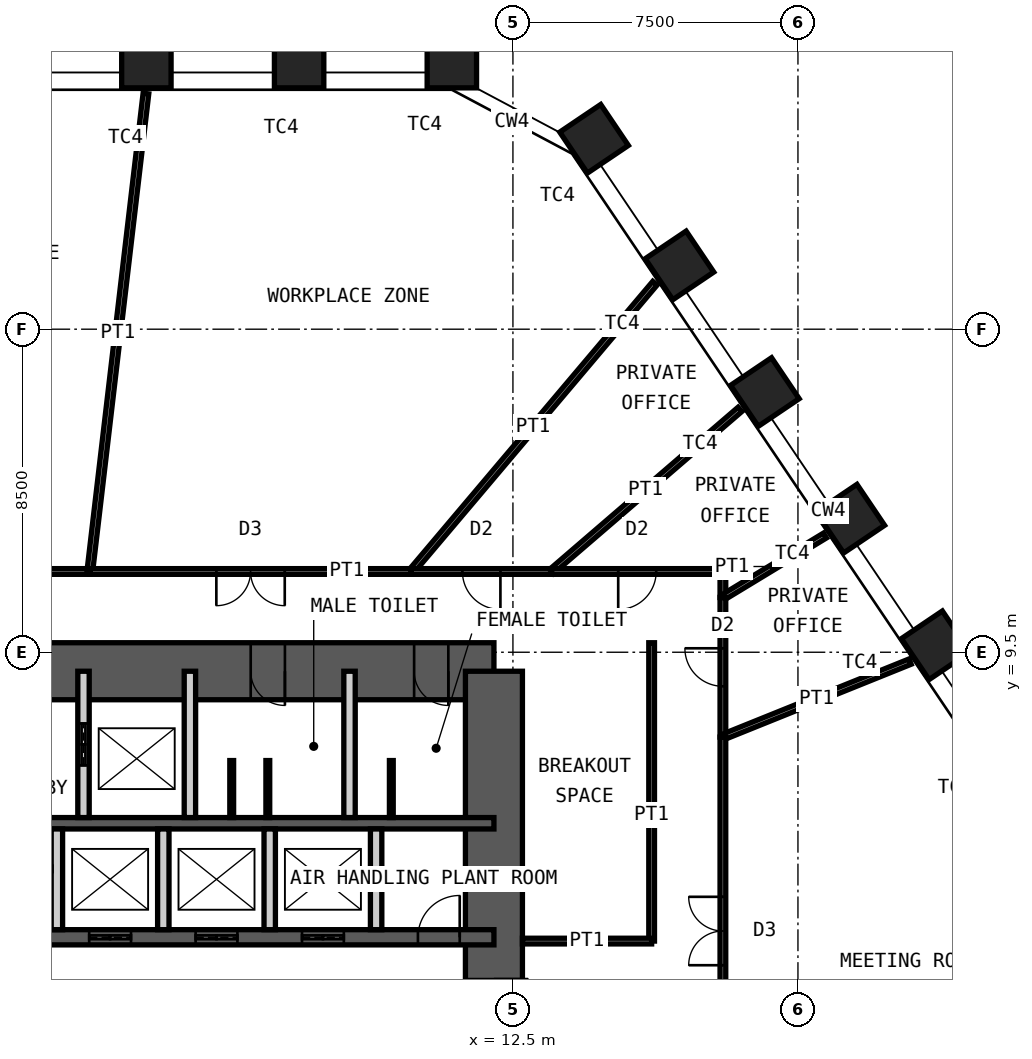
"""IFC4 building model, lengths in metres.
Left out: names, types, materials, properties, quantities, classifications, styles, units other than length and angle.
Written with IfcOpenShell. Run it as: python <this file> out.ifc"""

import sys

from ifc_helpers import new_model, si_unit, direction, frame, frame_2d, origin, origin_2d, place, context, subcontext, project, spatial, rectangle, hollow_rectangle, extrude, element, fill, save


model = new_model("IFC4")
c1 = context("Model", 3, precision=1e-05, world=origin(), true_north=direction((0.0, 1.0)))
c2 = subcontext(c1, "Body", "Model", "MODEL_VIEW")
j1 = project(units=[si_unit("LENGTHUNIT", "METRE"), si_unit("PLANEANGLEUNIT", "RADIAN")], contexts=[c1])
p1 = place(None, origin())
s1 = spatial("IfcSite", under=j1, at=p1, CompositionType="ELEMENT")
p2 = place(p1, origin())
s2 = spatial("IfcBuilding", under=s1, at=p2, CompositionType="ELEMENT")
p3 = place(p2, frame((0.0, 0.0, 157.6)))
s3 = spatial("IfcBuildingStorey", under=s2, at=p3, CompositionType="ELEMENT", Elevation=157.6)
for number, where, z_axis, x_axis in (
    (1, (2.854, 25.0, 0.0), (0.0, 0.0, 1.0), (-1.0, 0.0, 0.0)),
    (2, (6.874, 25.0, 0.0), (0.0, 0.0, 1.0), (-1.0, 0.0, 0.0)),
    (3, (10.893, 25.0, 0.0), (0.0, 0.0, 1.0), (-1.0, 0.0, 0.0)),
    (4, (14.635, 23.01, 0.0), (0.0, 0.0, 1.0), (-0.559, 0.829, 0.0)),
    (5, (16.882, 19.678, 0.0), (0.0, 0.0, 1.0), (-0.559, 0.829, 0.0)),
    (6, (19.13, 16.346, 0.0), (0.0, 0.0, 1.0), (-0.559, 0.829, 0.0)),
    (7, (21.377, 13.014, 0.0), (0.0, 0.0, 1.0), (-0.559, 0.829, 0.0)),
    (8, (23.625, 9.682, 0.0), (0.0, 0.0, 1.0), (-0.559, 0.829, 0.0)),
):
    element("IfcColumn", number, at=place(p3, frame(where, z_axis=z_axis, x_axis=x_axis)), inside=s3, PredefinedType="COLUMN", context=c2, shape_type="SweptSolid", body=[
        extrude(hollow_rectangle(XDim=1.3, YDim=1.3, WallThickness=0.1, at=origin_2d()), origin(), (0.0, 0.0, 1.0), 4.2),
    ])
p4 = place(p3, frame((-12.0, 9.0, 0.0), z_axis=(0.0, 0.0, 1.0), x_axis=(1.0, 0.0, 0.0)))
e9 = element("IfcWall", 9, at=p4, inside=s3, PredefinedType="SHEAR", context=c2, shape_type="SweptSolid", body=[
    extrude(rectangle(XDim=24.0, YDim=1.5, at=frame_2d((12.0, 0.0))), origin(), (0.0, 0.0, 1.0), 4.2),
])
p5 = place(p4, frame((10.4, 0.0, 0.0)))
e10 = element("IfcOpeningElement", 10, at=p5, cuts=e9, PredefinedType="OPENING", context=c2, shape_type="SweptSolid", body=[
    extrude(rectangle(XDim=1.0, YDim=2.1, at=frame_2d((0.5, 1.05))), frame((0.0, 0.76, 0.0), z_axis=(0.0, -1.0, 0.0), x_axis=(1.0, 0.0, 0.0)), (0.0, 0.0, 1.0), 1.52),
])
p6 = place(p4, frame((17.6, 0.0, 0.0)))
e11 = element("IfcOpeningElement", 11, at=p6, cuts=e9, PredefinedType="OPENING", context=c2, shape_type="SweptSolid", body=[
    extrude(rectangle(XDim=0.9, YDim=2.1, at=frame_2d((0.45, 1.05))), frame((0.0, 0.76, 0.0), z_axis=(0.0, -1.0, 0.0), x_axis=(1.0, 0.0, 0.0)), (0.0, 0.0, 1.0), 1.52),
])
p7 = place(p4, frame((21.9, 0.0, 0.0)))
e12 = element("IfcOpeningElement", 12, at=p7, cuts=e9, PredefinedType="OPENING", context=c2, shape_type="SweptSolid", body=[
    extrude(rectangle(XDim=0.9, YDim=2.1, at=frame_2d((0.45, 1.05))), frame((0.0, 0.76, 0.0), z_axis=(0.0, -1.0, 0.0), x_axis=(1.0, 0.0, 0.0)), (0.0, 0.0, 1.0), 1.52),
])
p8 = place(p3, frame((12.0, -9.0, 0.0), z_axis=(0.0, 0.0, 1.0), x_axis=(0.0, 1.0, 0.0)))
e13 = element("IfcWall", 13, at=p8, inside=s3, PredefinedType="SHEAR", context=c2, shape_type="SweptSolid", body=[
    extrude(rectangle(XDim=18.0, YDim=1.5, at=frame_2d((9.0, 0.0))), origin(), (0.0, 0.0, 1.0), 4.2),
])
p9 = place(p8, frame((8.1, 0.0, 0.0)))
e14 = element("IfcOpeningElement", 14, at=p9, cuts=e13, PredefinedType="OPENING", context=c2, shape_type="SweptSolid", body=[
    extrude(rectangle(XDim=1.8, YDim=2.1, at=frame_2d((0.9, 1.05))), frame((0.0, 0.76, 0.0), z_axis=(0.0, -1.0, 0.0), x_axis=(1.0, 0.0, 0.0)), (0.0, 0.0, 1.0), 1.52),
])
p10 = place(p3, frame((-12.0, 5.0, 0.0), z_axis=(0.0, 0.0, 1.0), x_axis=(1.0, 0.0, 0.0)))
e15 = element("IfcWall", 15, at=p10, inside=s3, PredefinedType="SHEAR", context=c2, shape_type="SweptSolid", body=[
    extrude(rectangle(XDim=24.0, YDim=0.3, at=frame_2d((12.0, 0.0))), origin(), (0.0, 0.0, 1.0), 4.2),
])
p11 = place(p3, frame((-12.0, 2.0, 0.0), z_axis=(0.0, 0.0, 1.0), x_axis=(1.0, 0.0, 0.0)))
e16 = element("IfcWall", 16, at=p11, inside=s3, PredefinedType="SHEAR", context=c2, shape_type="SweptSolid", body=[
    extrude(rectangle(XDim=24.0, YDim=0.4, at=frame_2d((12.0, 0.0))), origin(), (0.0, 0.0, 1.0), 4.2),
])
p12 = place(p11, frame((2.4, 0.0, 0.0)))
e17 = element("IfcOpeningElement", 17, at=p12, cuts=e16, PredefinedType="OPENING", context=c2, shape_type="SweptSolid", body=[
    extrude(rectangle(XDim=1.1, YDim=2.1, at=frame_2d((0.55, 1.05))), frame((0.0, 0.21, 0.0), z_axis=(0.0, -1.0, 0.0), x_axis=(1.0, 0.0, 0.0)), (0.0, 0.0, 1.0), 0.42),
])
p13 = place(p11, frame((22.0, 0.0, 0.0)))
e18 = element("IfcOpeningElement", 18, at=p13, cuts=e16, PredefinedType="OPENING", context=c2, shape_type="SweptSolid", body=[
    extrude(rectangle(XDim=1.1, YDim=2.1, at=frame_2d((0.55, 1.05))), frame((0.0, 0.21, 0.0), z_axis=(0.0, -1.0, 0.0), x_axis=(1.0, 0.0, 0.0)), (0.0, 0.0, 1.0), 0.42),
])
p14 = place(p11, frame((10.15, 0.0, 0.0)))
e19 = element("IfcOpeningElement", 19, at=p14, cuts=e16, PredefinedType="OPENING", context=c2, shape_type="SweptSolid", body=[
    extrude(rectangle(XDim=1.0, YDim=2.1, at=frame_2d((0.5, 1.05))), frame((0.0, 0.21, 0.0), z_axis=(0.0, -1.0, 0.0), x_axis=(1.0, 0.0, 0.0)), (0.0, 0.0, 1.0), 0.42),
])
p15 = place(p11, frame((6.9, 0.0, 0.0)))
e20 = element("IfcOpeningElement", 20, at=p15, cuts=e16, PredefinedType="OPENING", context=c2, shape_type="SweptSolid", body=[
    extrude(rectangle(XDim=1.0, YDim=2.1, at=frame_2d((0.5, 1.05))), frame((0.0, 0.21, 0.0), z_axis=(0.0, -1.0, 0.0), x_axis=(1.0, 0.0, 0.0)), (0.0, 0.0, 1.0), 0.42),
])
p16 = place(p11, frame((13.35, 0.0, 0.0)))
e21 = element("IfcOpeningElement", 21, at=p16, cuts=e16, PredefinedType="OPENING", context=c2, shape_type="SweptSolid", body=[
    extrude(rectangle(XDim=1.1, YDim=2.4, at=frame_2d((0.55, 1.2))), frame((0.0, 0.21, 0.0), z_axis=(0.0, -1.0, 0.0), x_axis=(1.0, 0.0, 0.0)), (0.0, 0.0, 1.0), 0.42),
])
p17 = place(p11, frame((16.15, 0.0, 0.0)))
e22 = element("IfcOpeningElement", 22, at=p17, cuts=e16, PredefinedType="OPENING", context=c2, shape_type="SweptSolid", body=[
    extrude(rectangle(XDim=1.1, YDim=2.4, at=frame_2d((0.55, 1.2))), frame((0.0, 0.21, 0.0), z_axis=(0.0, -1.0, 0.0), x_axis=(1.0, 0.0, 0.0)), (0.0, 0.0, 1.0), 0.42),
])
p18 = place(p11, frame((18.95, 0.0, 0.0)))
e23 = element("IfcOpeningElement", 23, at=p18, cuts=e16, PredefinedType="OPENING", context=c2, shape_type="SweptSolid", body=[
    extrude(rectangle(XDim=1.1, YDim=2.4, at=frame_2d((0.55, 1.2))), frame((0.0, 0.21, 0.0), z_axis=(0.0, -1.0, 0.0), x_axis=(1.0, 0.0, 0.0)), (0.0, 0.0, 1.0), 0.42),
])
p19 = place(p3, frame((1.2, 5.15, 0.0), z_axis=(0.0, 0.0, 1.0), x_axis=(0.0, 1.0, 0.0)))
e24 = element("IfcWall", 24, at=p19, inside=s3, PredefinedType="PARTITIONING", context=c2, shape_type="SweptSolid", body=[
    extrude(rectangle(XDim=3.85, YDim=0.3, at=frame_2d((1.925, 0.0))), origin(), (0.0, 0.0, 1.0), 3.98),
])
p20 = place(p19, frame((1.375, 0.0, 0.0)))
e25 = element("IfcOpeningElement", 25, at=p20, cuts=e24, PredefinedType="OPENING", context=c2, shape_type="SweptSolid", body=[
    extrude(rectangle(XDim=1.1, YDim=2.4, at=frame_2d((0.55, 1.2))), frame((0.0, 0.16, 0.0), z_axis=(0.0, -1.0, 0.0), x_axis=(1.0, 0.0, 0.0)), (0.0, 0.0, 1.0), 0.32),
])
for number, where, z_axis, x_axis in (
    (26, (4.0, 5.15, 0.0), (0.0, 0.0, 1.0), (0.0, 1.0, 0.0)),
    (27, (8.2, 5.15, 0.0), (0.0, 0.0, 1.0), (0.0, 1.0, 0.0)),
):
    element("IfcWall", number, at=place(p3, frame(where, z_axis=z_axis, x_axis=x_axis)), inside=s3, PredefinedType="PARTITIONING", context=c2, shape_type="SweptSolid", body=[
        extrude(rectangle(XDim=3.85, YDim=0.3, at=frame_2d((1.925, 0.0))), origin(), (0.0, 0.0, 1.0), 3.98),
    ])
for number, where, z_axis, x_axis in (
    (28, (0.5, 2.2, 0.0), (0.0, 0.0, 1.0), (0.0, 1.0, 0.0)),
    (29, (3.3, 2.2, 0.0), (0.0, 0.0, 1.0), (0.0, 1.0, 0.0)),
    (30, (6.1, 2.2, 0.0), (0.0, 0.0, 1.0), (0.0, 1.0, 0.0)),
    (31, (8.9, 2.2, 0.0), (0.0, 0.0, 1.0), (0.0, 1.0, 0.0)),
):
    element("IfcWall", number, at=place(p3, frame(where, z_axis=z_axis, x_axis=x_axis)), inside=s3, PredefinedType="PARTITIONING", context=c2, shape_type="SweptSolid", body=[
        extrude(rectangle(XDim=2.65, YDim=0.3, at=frame_2d((1.325, 0.0))), origin(), (0.0, 0.0, 1.0), 3.98),
    ])
for number, where, z_axis, x_axis in (
    (32, (5.1, 5.15, 0.0), (0.0, 0.0, 1.0), (0.0, 1.0, 0.0)),
    (33, (6.05, 5.15, 0.0), (0.0, 0.0, 1.0), (0.0, 1.0, 0.0)),
    (34, (9.3, 5.15, 0.0), (0.0, 0.0, 1.0), (0.0, 1.0, 0.0)),
):
    element("IfcWall", number, at=place(p3, frame(where, z_axis=z_axis, x_axis=x_axis)), inside=s3, PredefinedType="PARTITIONING", context=c2, shape_type="SweptSolid", body=[
        extrude(rectangle(XDim=1.5, YDim=0.1, at=frame_2d((0.75, 0.0))), origin(), (0.0, 0.0, 1.0), 2.1),
    ])
p21 = place(p3, frame((16.237, 19.21, 0.0), z_axis=(0.0, 0.0, 1.0), x_axis=(-0.645526723652, -0.763737683404, 0.0)))
e35 = element("IfcWall", 35, at=p21, inside=s3, PredefinedType="PARTITIONING", context=c2, shape_type="SweptSolid", body=[
    extrude(rectangle(XDim=9.932, YDim=0.15, at=frame_2d((4.966, 0.0))), origin(), (0.0, 0.0, 1.0), 3.33),
])
p22 = place(p3, frame((9.826, 11.625, 0.0), z_axis=(0.0, 0.0, 1.0), x_axis=(1.0, 0.0, 0.0)))
e36 = element("IfcWall", 36, at=p22, inside=s3, PredefinedType="PARTITIONING", context=c2, shape_type="SweptSolid", body=[
    extrude(rectangle(XDim=3.689, YDim=0.15, at=frame_2d((1.845, 0.0))), origin(), (0.0, 0.0, 1.0), 4.03),
])
p23 = place(p22, frame((1.345, 0.0, 0.0)))
e37 = element("IfcOpeningElement", 37, at=p23, cuts=e36, PredefinedType="OPENING", context=c2, shape_type="SweptSolid", body=[
    extrude(rectangle(XDim=1.0, YDim=2.4, at=frame_2d((0.5, 1.2))), frame((0.0, 0.085, 0.0), z_axis=(0.0, -1.0, 0.0), x_axis=(1.0, 0.0, 0.0)), (0.0, 0.0, 1.0), 0.17),
])
p24 = place(p3, frame((18.474, 15.89, 0.0), z_axis=(0.0, 0.0, 1.0), x_axis=(-0.758143486665, -0.65208776528, 0.0)))
e38 = element("IfcWall", 38, at=p24, inside=s3, PredefinedType="PARTITIONING", context=c2, shape_type="SweptSolid", body=[
    extrude(rectangle(XDim=6.54, YDim=0.15, at=frame_2d((3.27, 0.0))), origin(), (0.0, 0.0, 1.0), 3.33),
])
p25 = place(p3, frame((13.515, 11.625, 0.0), z_axis=(0.0, 0.0, 1.0), x_axis=(1.0, 0.0, 0.0)))
e39 = element("IfcWall", 39, at=p25, inside=s3, PredefinedType="PARTITIONING", context=c2, shape_type="SweptSolid", body=[
    extrude(rectangle(XDim=4.51, YDim=0.15, at=frame_2d((2.255, 0.0))), origin(), (0.0, 0.0, 1.0), 4.03),
])
p26 = place(p25, frame((1.755, 0.0, 0.0)))
e40 = element("IfcOpeningElement", 40, at=p26, cuts=e39, PredefinedType="OPENING", context=c2, shape_type="SweptSolid", body=[
    extrude(rectangle(XDim=1.0, YDim=2.4, at=frame_2d((0.5, 1.2))), frame((0.0, 0.085, 0.0), z_axis=(0.0, -1.0, 0.0), x_axis=(1.0, 0.0, 0.0)), (0.0, 0.0, 1.0), 0.17),
])
p27 = place(p3, frame((18.025, 11.625, 0.0), z_axis=(0.0, 0.0, 1.0), x_axis=(0.0, -1.0, 0.0)))
e41 = element("IfcWall", 41, at=p27, inside=s3, PredefinedType="PARTITIONING", context=c2, shape_type="SweptSolid", body=[
    extrude(rectangle(XDim=0.684, YDim=0.15, at=frame_2d((0.342, 0.0))), origin(), (0.0, 0.0, 1.0), 4.03),
])
p28 = place(p3, frame((20.711, 12.571, 0.0), z_axis=(0.0, 0.0, 1.0), x_axis=(-0.854890890653, -0.518807830587, 0.0)))
e42 = element("IfcWall", 42, at=p28, inside=s3, PredefinedType="PARTITIONING", context=c2, shape_type="SweptSolid", body=[
    extrude(rectangle(XDim=3.143, YDim=0.15, at=frame_2d((1.571, 0.0))), origin(), (0.0, 0.0, 1.0), 3.33),
])
p29 = place(p3, frame((18.025, 10.941, 0.0), z_axis=(0.0, 0.0, 1.0), x_axis=(0.0, -1.0, 0.0)))
e43 = element("IfcWall", 43, at=p29, inside=s3, PredefinedType="PARTITIONING", context=c2, shape_type="SweptSolid", body=[
    extrude(rectangle(XDim=3.673, YDim=0.15, at=frame_2d((1.837, 0.0))), origin(), (0.0, 0.0, 1.0), 4.03),
])
p30 = place(p29, frame((1.337, 0.0, 0.0)))
e44 = element("IfcOpeningElement", 44, at=p30, cuts=e43, PredefinedType="OPENING", context=c2, shape_type="SweptSolid", body=[
    extrude(rectangle(XDim=1.0, YDim=2.4, at=frame_2d((0.5, 1.2))), frame((0.0, 0.085, 0.0), z_axis=(0.0, -1.0, 0.0), x_axis=(1.0, 0.0, 0.0)), (0.0, 0.0, 1.0), 0.17),
])
p31 = place(p3, frame((22.951, 9.254, 0.0), z_axis=(0.0, 0.0, 1.0), x_axis=(-0.927452527427, -0.37394091695, 0.0)))
e45 = element("IfcWall", 45, at=p31, inside=s3, PredefinedType="PARTITIONING", context=c2, shape_type="SweptSolid", body=[
    extrude(rectangle(XDim=5.312, YDim=0.15, at=frame_2d((2.656, 0.0))), origin(), (0.0, 0.0, 1.0), 3.33),
])
p32 = place(p3, frame((18.025, 7.267, 0.0), z_axis=(0.0, 0.0, 1.0), x_axis=(0.0, -1.0, 0.0)))
e46 = element("IfcWall", 46, at=p32, inside=s3, PredefinedType="PARTITIONING", context=c2, shape_type="SweptSolid", body=[
    extrude(rectangle(XDim=10.205, YDim=0.15, at=frame_2d((5.103, 0.0))), origin(), (0.0, 0.0, 1.0), 4.03),
])
p33 = place(p32, frame((4.203, 0.0, 0.0)))
e47 = element("IfcOpeningElement", 47, at=p33, cuts=e46, PredefinedType="OPENING", context=c2, shape_type="SweptSolid", body=[
    extrude(rectangle(XDim=1.8, YDim=2.4, at=frame_2d((0.9, 1.2))), frame((0.0, 0.085, 0.0), z_axis=(0.0, -1.0, 0.0), x_axis=(1.0, 0.0, 0.0)), (0.0, 0.0, 1.0), 0.17),
])
p34 = place(p3, frame((-4.403, 11.625, 0.0), z_axis=(0.0, 0.0, 1.0), x_axis=(1.0, 0.0, 0.0)))
e48 = element("IfcWall", 48, at=p34, inside=s3, PredefinedType="PARTITIONING", context=c2, shape_type="SweptSolid", body=[
    extrude(rectangle(XDim=5.768, YDim=0.15, at=frame_2d((2.884, 0.0))), origin(), (0.0, 0.0, 1.0), 4.03),
])
p35 = place(p34, frame((1.984, 0.0, 0.0)))
e49 = element("IfcOpeningElement", 49, at=p35, cuts=e48, PredefinedType="OPENING", context=c2, shape_type="SweptSolid", body=[
    extrude(rectangle(XDim=1.8, YDim=2.4, at=frame_2d((0.9, 1.2))), frame((0.0, 0.085, 0.0), z_axis=(0.0, -1.0, 0.0), x_axis=(1.0, 0.0, 0.0)), (0.0, 0.0, 1.0), 0.17),
])
p36 = place(p3, frame((2.843, 24.201, 0.0), z_axis=(0.0, 0.0, 1.0), x_axis=(-0.116670084723, -0.993170726175, 0.0)))
e50 = element("IfcWall", 50, at=p36, inside=s3, PredefinedType="PARTITIONING", context=c2, shape_type="SweptSolid", body=[
    extrude(rectangle(XDim=12.662, YDim=0.15, at=frame_2d((6.331, 0.0))), origin(), (0.0, 0.0, 1.0), 3.33),
])
p37 = place(p3, frame((1.366, 11.625, 0.0), z_axis=(0.0, 0.0, 1.0), x_axis=(1.0, 0.0, 0.0)))
e51 = element("IfcWall", 51, at=p37, inside=s3, PredefinedType="PARTITIONING", context=c2, shape_type="SweptSolid", body=[
    extrude(rectangle(XDim=8.46, YDim=0.15, at=frame_2d((4.23, 0.0))), origin(), (0.0, 0.0, 1.0), 4.03),
])
p38 = place(p37, frame((3.33, 0.0, 0.0)))
e52 = element("IfcOpeningElement", 52, at=p38, cuts=e51, PredefinedType="OPENING", context=c2, shape_type="SweptSolid", body=[
    extrude(rectangle(XDim=1.8, YDim=2.4, at=frame_2d((0.9, 1.2))), frame((0.0, 0.085, 0.0), z_axis=(0.0, -1.0, 0.0), x_axis=(1.0, 0.0, 0.0)), (0.0, 0.0, 1.0), 0.17),
])
p39 = place(p3, frame((16.15, 1.9, 0.0), z_axis=(0.0, 0.0, 1.0), x_axis=(0.0, 1.0, 0.0)))
e53 = element("IfcWall", 53, at=p39, inside=s3, PredefinedType="PARTITIONING", context=c2, shape_type="SweptSolid", body=[
    extrude(rectangle(XDim=7.85, YDim=0.15, at=frame_2d((3.925, 0.0))), origin(), (0.0, 0.0, 1.0), 4.03),
])
p40 = place(p3, frame((12.75, 1.9, 0.0), z_axis=(0.0, 0.0, 1.0), x_axis=(1.0, 0.0, 0.0)))
e54 = element("IfcWall", 54, at=p40, inside=s3, PredefinedType="PARTITIONING", context=c2, shape_type="SweptSolid", body=[
    extrude(rectangle(XDim=3.4, YDim=0.15, at=frame_2d((1.7, 0.0))), origin(), (0.0, 0.0, 1.0), 2.93),
])
p41 = place(p6, origin())
e55 = element("IfcDoor", 55, at=p41, inside=s3, OperationType="SINGLE_SWING_RIGHT", PredefinedType="DOOR", context=c2, shape_type="SweptSolid", body=[
    extrude(rectangle(XDim=0.9, YDim=2.1, at=frame_2d((0.45, 1.05))), frame((0.0, 0.025, 0.0), z_axis=(0.0, -1.0, 0.0), x_axis=(1.0, 0.0, 0.0)), (0.0, 0.0, 1.0), 0.05),
])
fill(e11, e55)
p42 = place(p7, origin())
e56 = element("IfcDoor", 56, at=p42, inside=s3, OperationType="SINGLE_SWING_RIGHT", PredefinedType="DOOR", context=c2, shape_type="SweptSolid", body=[
    extrude(rectangle(XDim=0.9, YDim=2.1, at=frame_2d((0.45, 1.05))), frame((0.0, 0.025, 0.0), z_axis=(0.0, -1.0, 0.0), x_axis=(1.0, 0.0, 0.0)), (0.0, 0.0, 1.0), 0.05),
])
fill(e12, e56)
p43 = place(p13, origin())
e57 = element("IfcDoor", 57, at=p43, inside=s3, OperationType="SINGLE_SWING_LEFT", PredefinedType="DOOR", context=c2, shape_type="SweptSolid", body=[
    extrude(rectangle(XDim=1.1, YDim=2.1, at=frame_2d((0.55, 1.05))), frame((0.0, 0.025, 0.0), z_axis=(0.0, -1.0, 0.0), x_axis=(1.0, 0.0, 0.0)), (0.0, 0.0, 1.0), 0.05),
])
fill(e18, e57)
p44 = place(p9, origin())
e58 = element("IfcDoor", 58, at=p44, inside=s3, OperationType="DOUBLE_DOOR_DOUBLE_SWING", PredefinedType="DOOR", context=c2, shape_type="SweptSolid", body=[
    extrude(rectangle(XDim=1.8, YDim=2.1, at=frame_2d((0.9, 1.05))), frame((0.0, 0.025, 0.0), z_axis=(0.0, -1.0, 0.0), x_axis=(1.0, 0.0, 0.0)), (0.0, 0.0, 1.0), 0.05),
])
fill(e14, e58)
p45 = place(p20, origin())
e59 = element("IfcDoor", 59, at=p45, inside=s3, OperationType="DOUBLE_DOOR_SLIDING", PredefinedType="DOOR", context=c2, shape_type="SweptSolid", body=[
    extrude(rectangle(XDim=1.1, YDim=2.4, at=frame_2d((0.55, 1.2))), frame((0.0, 0.025, 0.0), z_axis=(0.0, -1.0, 0.0), x_axis=(1.0, 0.0, 0.0)), (0.0, 0.0, 1.0), 0.05),
])
fill(e25, e59)
p46 = place(p16, origin())
e60 = element("IfcDoor", 60, at=p46, inside=s3, OperationType="DOUBLE_DOOR_SLIDING", PredefinedType="DOOR", context=c2, shape_type="SweptSolid", body=[
    extrude(rectangle(XDim=1.1, YDim=2.4, at=frame_2d((0.55, 1.2))), frame((0.0, 0.025, 0.0), z_axis=(0.0, -1.0, 0.0), x_axis=(1.0, 0.0, 0.0)), (0.0, 0.0, 1.0), 0.05),
])
fill(e21, e60)
p47 = place(p17, origin())
e61 = element("IfcDoor", 61, at=p47, inside=s3, OperationType="DOUBLE_DOOR_SLIDING", PredefinedType="DOOR", context=c2, shape_type="SweptSolid", body=[
    extrude(rectangle(XDim=1.1, YDim=2.4, at=frame_2d((0.55, 1.2))), frame((0.0, 0.025, 0.0), z_axis=(0.0, -1.0, 0.0), x_axis=(1.0, 0.0, 0.0)), (0.0, 0.0, 1.0), 0.05),
])
fill(e22, e61)
p48 = place(p18, origin())
e62 = element("IfcDoor", 62, at=p48, inside=s3, OperationType="DOUBLE_DOOR_SLIDING", PredefinedType="DOOR", context=c2, shape_type="SweptSolid", body=[
    extrude(rectangle(XDim=1.1, YDim=2.4, at=frame_2d((0.55, 1.2))), frame((0.0, 0.025, 0.0), z_axis=(0.0, -1.0, 0.0), x_axis=(1.0, 0.0, 0.0)), (0.0, 0.0, 1.0), 0.05),
])
fill(e23, e62)
p49 = place(p23, origin())
e63 = element("IfcDoor", 63, at=p49, inside=s3, OperationType="SINGLE_SWING_RIGHT", PredefinedType="DOOR", context=c2, shape_type="SweptSolid", body=[
    extrude(rectangle(XDim=1.0, YDim=2.4, at=frame_2d((0.5, 1.2))), frame((0.0, 0.025, 0.0), z_axis=(0.0, -1.0, 0.0), x_axis=(1.0, 0.0, 0.0)), (0.0, 0.0, 1.0), 0.05),
])
fill(e37, e63)
p50 = place(p26, origin())
e64 = element("IfcDoor", 64, at=p50, inside=s3, OperationType="SINGLE_SWING_LEFT", PredefinedType="DOOR", context=c2, shape_type="SweptSolid", body=[
    extrude(rectangle(XDim=1.0, YDim=2.4, at=frame_2d((0.5, 1.2))), frame((0.0, 0.025, 0.0), z_axis=(0.0, -1.0, 0.0), x_axis=(1.0, 0.0, 0.0)), (0.0, 0.0, 1.0), 0.05),
])
fill(e40, e64)
p51 = place(p30, origin())
e65 = element("IfcDoor", 65, at=p51, inside=s3, OperationType="SINGLE_SWING_LEFT", PredefinedType="DOOR", context=c2, shape_type="SweptSolid", body=[
    extrude(rectangle(XDim=1.0, YDim=2.4, at=frame_2d((0.5, 1.2))), frame((0.0, 0.025, 0.0), z_axis=(0.0, -1.0, 0.0), x_axis=(1.0, 0.0, 0.0)), (0.0, 0.0, 1.0), 0.05),
])
fill(e44, e65)
p52 = place(p33, origin())
e66 = element("IfcDoor", 66, at=p52, inside=s3, OperationType="DOUBLE_DOOR_DOUBLE_SWING", PredefinedType="DOOR", context=c2, shape_type="SweptSolid", body=[
    extrude(rectangle(XDim=1.8, YDim=2.4, at=frame_2d((0.9, 1.2))), frame((0.0, 0.025, 0.0), z_axis=(0.0, -1.0, 0.0), x_axis=(1.0, 0.0, 0.0)), (0.0, 0.0, 1.0), 0.05),
])
fill(e47, e66)
p53 = place(p38, origin())
e67 = element("IfcDoor", 67, at=p53, inside=s3, OperationType="DOUBLE_DOOR_DOUBLE_SWING", PredefinedType="DOOR", context=c2, shape_type="SweptSolid", body=[
    extrude(rectangle(XDim=1.8, YDim=2.4, at=frame_2d((0.9, 1.2))), frame((0.0, 0.025, 0.0), z_axis=(0.0, -1.0, 0.0), x_axis=(1.0, 0.0, 0.0)), (0.0, 0.0, 1.0), 0.05),
])
fill(e52, e67)
save(model, sys.argv[1])
